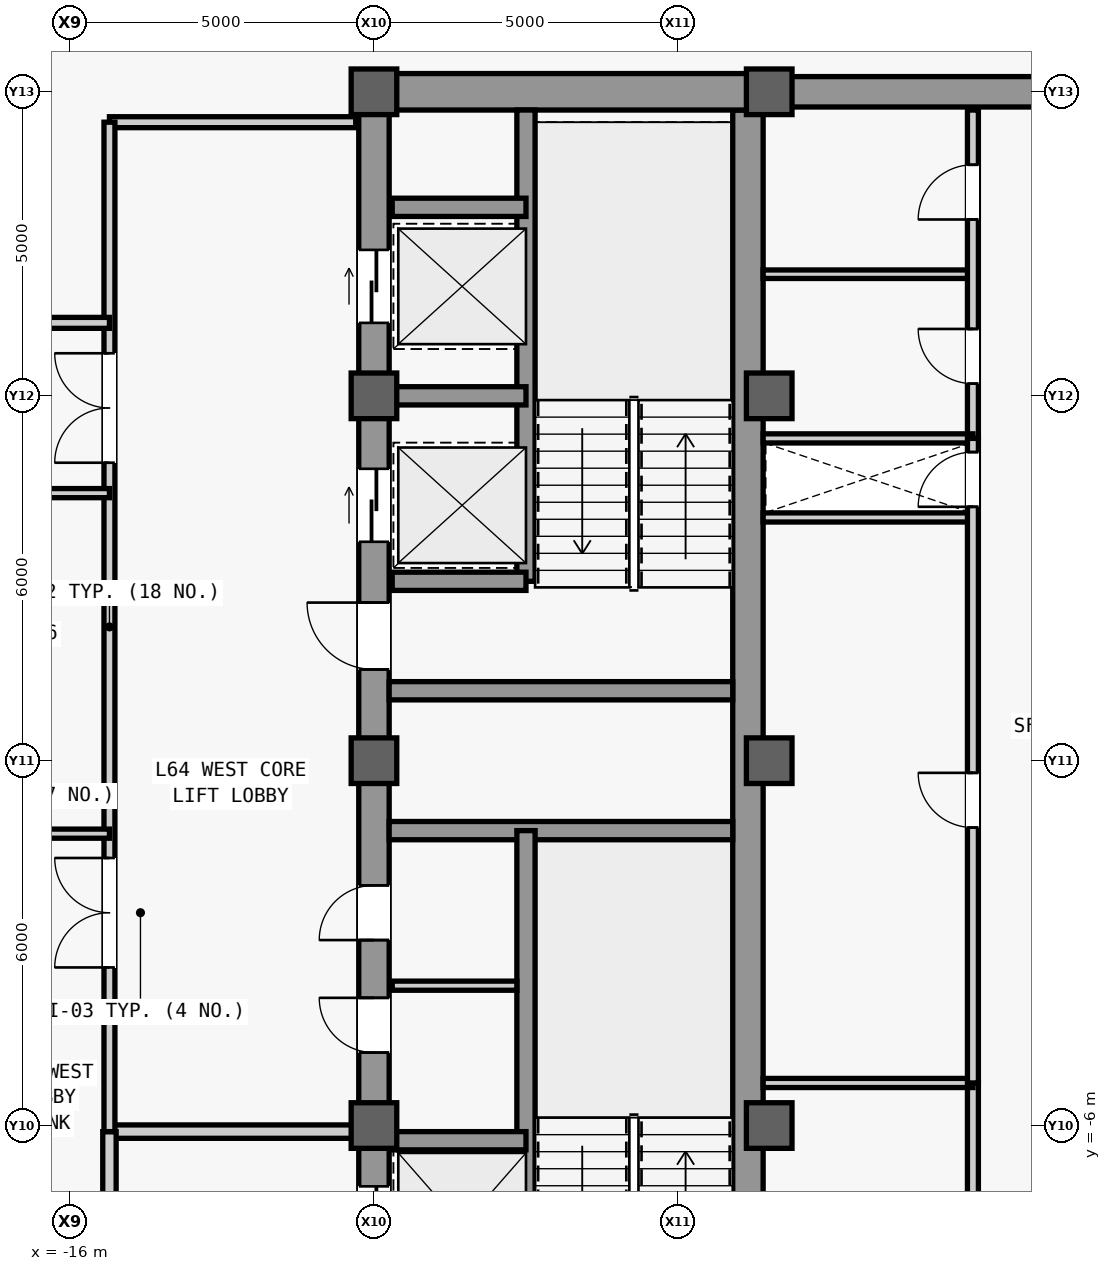
"""IFC4 building model, lengths in metres.
Left out: names, types, materials, properties, quantities, classifications, styles, units other than length and angle.
Written with IfcOpenShell. Run it as: python <this file> out.ifc"""

import sys

from ifc_helpers import new_model, si_unit, direction, frame, frame_2d, origin, origin_2d, place, context, subcontext, project, spatial, rectangle, extrude, source, transform, mapped, element, fill, save


model = new_model("IFC4")
c1 = context("Model", 3, precision=1e-05, world=origin(), true_north=direction((0.0, 1.0)))
c2 = subcontext(c1, "Body", "Model", "MODEL_VIEW")
j1 = project(units=[si_unit("LENGTHUNIT", "METRE"), si_unit("PLANEANGLEUNIT", "RADIAN")], contexts=[c1])
p1 = place(None, origin())
s1 = spatial("IfcSite", under=j1, at=p1, CompositionType="ELEMENT")
p2 = place(p1, origin())
s2 = spatial("IfcBuilding", under=s1, at=p2, CompositionType="ELEMENT")
p3 = place(p2, frame((0.0, 0.0, 273.5)))
s3 = spatial("IfcBuildingStorey", under=s2, at=p3, CompositionType="ELEMENT", Elevation=273.5)
m1 = source(origin(), c2, "Body", "SweptSolid", [
    extrude(rectangle(XDim=22.0, YDim=0.5, at=frame_2d((11.0, 0.0))), origin(), (0.0, 0.0, 1.0), 3.78),
])
p4 = place(p3, frame((-11.0, -11.0, 0.0), z_axis=(0.0, 0.0, 1.0), x_axis=(0.0, 1.0, 0.0)))
e1 = element("IfcWall", 1, at=p4, inside=s3, PredefinedType="SHEAR", context=c2, shape_type="MappedRepresentation", body=[
    mapped(m1, transform((0.0, 0.0, 0.0), scale=1.0)),
])
m2 = source(origin(), c2, "Body", "SweptSolid", [
    extrude(rectangle(XDim=1.1, YDim=2.2, at=frame_2d((0.55, 1.1))), frame((0.0, 0.26, 0.0), z_axis=(0.0, -1.0, 0.0), x_axis=(1.0, 0.0, 0.0)), (0.0, 0.0, 1.0), 0.52),
])
p5 = place(p4, frame((0.8, 0.0, 0.0)))
e2 = element("IfcOpeningElement", 2, at=p5, cuts=e1, PredefinedType="OPENING", context=c2, shape_type="MappedRepresentation", body=[
    mapped(m2, transform((0.0, 0.0, 0.0), scale=1.0)),
])
p6 = place(p4, frame((12.5, 0.0, 0.0)))
e3 = element("IfcOpeningElement", 3, at=p6, cuts=e1, PredefinedType="OPENING", context=c2, shape_type="MappedRepresentation", body=[
    mapped(m2, transform((0.0, 0.0, 0.0), scale=1.0)),
])
m3 = source(origin(), c2, "Body", "SweptSolid", [
    extrude(rectangle(XDim=0.9, YDim=2.15, at=frame_2d((0.45, 1.075))), frame((0.0, 0.26, 0.0), z_axis=(0.0, -1.0, 0.0), x_axis=(1.0, 0.0, 0.0)), (0.0, 0.0, 1.0), 0.52),
])
p7 = place(p4, frame((6.2, 0.0, 0.0)))
e4 = element("IfcOpeningElement", 4, at=p7, cuts=e1, PredefinedType="OPENING", context=c2, shape_type="MappedRepresentation", body=[
    mapped(m3, transform((0.0, 0.0, 0.0), scale=1.0)),
])
p8 = place(p4, frame((8.05, 0.0, 0.0)))
e5 = element("IfcOpeningElement", 5, at=p8, cuts=e1, PredefinedType="OPENING", context=c2, shape_type="MappedRepresentation", body=[
    mapped(m3, transform((0.0, 0.0, 0.0), scale=1.0)),
])
m4 = source(origin(), c2, "Body", "SweptSolid", [
    extrude(rectangle(XDim=1.2, YDim=2.3, at=frame_2d((0.6, 1.15))), frame((0.0, 0.26, 0.0), z_axis=(0.0, -1.0, 0.0), x_axis=(1.0, 0.0, 0.0)), (0.0, 0.0, 1.0), 0.52),
])
p9 = place(p4, frame((14.6, 0.0, 0.0)))
e6 = element("IfcOpeningElement", 6, at=p9, cuts=e1, PredefinedType="OPENING", context=c2, shape_type="MappedRepresentation", body=[
    mapped(m4, transform((0.0, 0.0, 0.0), scale=1.0)),
])
p10 = place(p4, frame((18.2, 0.0, 0.0)))
e7 = element("IfcOpeningElement", 7, at=p10, cuts=e1, PredefinedType="OPENING", context=c2, shape_type="MappedRepresentation", body=[
    mapped(m4, transform((0.0, 0.0, 0.0), scale=1.0)),
])
m5 = source(origin(), c2, "Body", "SweptSolid", [
    extrude(rectangle(XDim=1.3, YDim=2.3, at=frame_2d((0.65, 1.15))), frame((0.0, 0.26, 0.0), z_axis=(0.0, -1.0, 0.0), x_axis=(1.0, 0.0, 0.0)), (0.0, 0.0, 1.0), 0.52),
])
p11 = place(p4, frame((2.7, 0.0, 0.0)))
e8 = element("IfcOpeningElement", 8, at=p11, cuts=e1, PredefinedType="OPENING", context=c2, shape_type="MappedRepresentation", body=[
    mapped(m5, transform((0.0, 0.0, 0.0), scale=1.0)),
])
m6 = source(origin(), c2, "Body", "SweptSolid", [
    extrude(rectangle(XDim=21.4, YDim=0.5, at=frame_2d((10.7, 0.0))), origin(), (0.0, 0.0, 1.0), 3.78),
])
p12 = place(p3, frame((-4.85, -10.7, 0.0), z_axis=(0.0, 0.0, 1.0), x_axis=(0.0, 1.0, 0.0)))
e9 = element("IfcWall", 9, at=p12, inside=s3, PredefinedType="SHEAR", context=c2, shape_type="MappedRepresentation", body=[
    mapped(m6, transform((0.0, 0.0, 0.0), scale=1.0)),
])
m7 = source(origin(), c2, "Body", "SweptSolid", [
    extrude(rectangle(XDim=5.9, YDim=0.6, at=frame_2d((2.95, 0.0))), origin(), (0.0, 0.0, 1.0), 3.78),
])
p13 = place(p3, frame((-10.75, 11.0, 0.0), z_axis=(0.0, 0.0, 1.0), x_axis=(1.0, 0.0, 0.0)))
e10 = element("IfcWall", 10, at=p13, inside=s3, PredefinedType="SHEAR", context=c2, shape_type="MappedRepresentation", body=[
    mapped(m7, transform((0.0, 0.0, 0.0), scale=1.0)),
])
m8 = source(origin(), c2, "Body", "SweptSolid", [
    extrude(rectangle(XDim=5.65, YDim=0.3, at=frame_2d((2.825, 0.0))), origin(), (0.0, 0.0, 1.0), 3.78),
])
for number, where, z_axis, x_axis in (
    (11, (-10.75, -1.15, 0.0), (0.0, 0.0, 1.0), (1.0, 0.0, 0.0)),
    (12, (-10.75, 1.15, 0.0), (0.0, 0.0, 1.0), (1.0, 0.0, 0.0)),
):
    element("IfcWall", number, at=place(p3, frame(where, z_axis=z_axis, x_axis=x_axis)), inside=s3, PredefinedType="SHEAR", context=c2, shape_type="MappedRepresentation", body=[
        mapped(m8, transform((0.0, 0.0, 0.0), scale=1.0)),
    ])
m9 = source(origin(), c2, "Body", "SweptSolid", [
    extrude(rectangle(XDim=9.2, YDim=0.5, at=frame_2d((4.6, 0.0))), origin(), (0.0, 0.0, 1.0), 3.78),
])
p14 = place(p3, frame((-4.6, 11.0, 0.0), z_axis=(0.0, 0.0, 1.0), x_axis=(1.0, 0.0, 0.0)))
e13 = element("IfcWall", 13, at=p14, inside=s3, PredefinedType="SHEAR", context=c2, shape_type="MappedRepresentation", body=[
    mapped(m9, transform((0.0, 0.0, 0.0), scale=1.0)),
])
m10 = source(origin(), c2, "Body", "SweptSolid", [
    extrude(rectangle(XDim=0.75, YDim=0.75, at=origin_2d()), origin(), (0.0, 0.0, 1.0), 4.0),
])
for number, where, z_axis, x_axis in (
    (14, (-11.0, -6.0, 0.0), (0.0, 0.0, 1.0), (1.0, 0.0, 0.0)),
    (15, (-11.0, 0.0, 0.0), (0.0, 0.0, 1.0), (1.0, 0.0, 0.0)),
    (16, (-11.0, 6.0, 0.0), (0.0, 0.0, 1.0), (1.0, 0.0, 0.0)),
    (17, (-11.0, 11.0, 0.0), (0.0, 0.0, 1.0), (1.0, 0.0, 0.0)),
    (18, (-4.5, -6.0, 0.0), (0.0, 0.0, 1.0), (1.0, 0.0, 0.0)),
    (19, (-4.5, 0.0, 0.0), (0.0, 0.0, 1.0), (1.0, 0.0, 0.0)),
    (20, (-4.5, 6.0, 0.0), (0.0, 0.0, 1.0), (1.0, 0.0, 0.0)),
    (21, (-4.5, 11.0, 0.0), (0.0, 0.0, 1.0), (1.0, 0.0, 0.0)),
):
    element("IfcColumn", number, at=place(p3, frame(where, z_axis=z_axis, x_axis=x_axis)), inside=s3, PredefinedType="COLUMN", context=c2, shape_type="MappedRepresentation", body=[
        mapped(m10, transform((0.0, 0.0, 0.0), scale=1.0)),
    ])
m11 = source(origin(), c2, "Body", "SweptSolid", [
    extrude(rectangle(XDim=7.8, YDim=0.3, at=frame_2d((3.9, 0.0))), origin(), (0.0, 0.0, 1.0), 3.78),
])
p15 = place(p3, frame((-8.5, -8.95, 0.0), z_axis=(0.0, 0.0, 1.0), x_axis=(0.0, 1.0, 0.0)))
e22 = element("IfcWall", 22, at=p15, inside=s3, PredefinedType="SHEAR", context=c2, shape_type="MappedRepresentation", body=[
    mapped(m11, transform((0.0, 0.0, 0.0), scale=1.0)),
])
m12 = source(origin(), c2, "Body", "SweptSolid", [
    extrude(rectangle(XDim=2.2, YDim=0.3, at=frame_2d((1.1, 0.0))), origin(), (0.0, 0.0, 1.0), 3.78),
])
p16 = place(p3, frame((-10.7, -6.25, 0.0), z_axis=(0.0, 0.0, 1.0), x_axis=(1.0, 0.0, 0.0)))
e23 = element("IfcWall", 23, at=p16, inside=s3, PredefinedType="SHEAR", context=c2, shape_type="MappedRepresentation", body=[
    mapped(m12, transform((0.0, 0.0, 0.0), scale=1.0)),
])
m13 = source(origin(), c2, "Body", "SweptSolid", [
    extrude(rectangle(XDim=7.75, YDim=0.3, at=frame_2d((3.875, 0.0))), origin(), (0.0, 0.0, 1.0), 3.78),
])
p17 = place(p3, frame((-8.5, 2.95, 0.0), z_axis=(0.0, 0.0, 1.0), x_axis=(0.0, 1.0, 0.0)))
e24 = element("IfcWall", 24, at=p17, inside=s3, PredefinedType="SHEAR", context=c2, shape_type="MappedRepresentation", body=[
    mapped(m13, transform((0.0, 0.0, 0.0), scale=1.0)),
])
for number, where, z_axis, x_axis in (
    (25, (-10.7, 2.95, 0.0), (0.0, 0.0, 1.0), (1.0, 0.0, 0.0)),
    (26, (-10.7, 6.0, 0.0), (0.0, 0.0, 1.0), (1.0, 0.0, 0.0)),
    (27, (-10.7, 9.1, 0.0), (0.0, 0.0, 1.0), (1.0, 0.0, 0.0)),
):
    element("IfcWall", number, at=place(p3, frame(where, z_axis=z_axis, x_axis=x_axis)), inside=s3, PredefinedType="SHEAR", context=c2, shape_type="MappedRepresentation", body=[
        mapped(m12, transform((0.0, 0.0, 0.0), scale=1.0)),
    ])
m14 = source(origin(), c2, "Body", "SweptSolid", [
    extrude(rectangle(XDim=2.05, YDim=0.15, at=frame_2d((1.025, 0.0))), origin(), (0.0, 0.0, 1.0), 3.78),
])
p18 = place(p3, frame((-10.7, -3.7, 0.0), z_axis=(0.0, 0.0, 1.0), x_axis=(1.0, 0.0, 0.0)))
e28 = element("IfcWall", 28, at=p18, inside=s3, PredefinedType="PARTITIONING", context=c2, shape_type="MappedRepresentation", body=[
    mapped(m14, transform((0.0, 0.0, 0.0), scale=1.0)),
])
m15 = source(origin(), c2, "Body", "SweptSolid", [
    extrude(rectangle(XDim=4.05, YDim=0.22, at=frame_2d((2.025, 0.0))), origin(), (0.0, 0.0, 1.0), 3.085),
])
p19 = place(p3, frame((-15.35, -6.1, 0.0), z_axis=(0.0, 0.0, 1.0), x_axis=(1.0, 0.0, 0.0)))
e29 = element("IfcWall", 29, at=p19, inside=s3, PredefinedType="PARTITIONING", context=c2, shape_type="MappedRepresentation", body=[
    mapped(m15, transform((0.0, 0.0, 0.0), scale=1.0)),
])
m16 = source(origin(), c2, "Body", "SweptSolid", [
    extrude(rectangle(XDim=4.4, YDim=0.22, at=frame_2d((2.2, 0.0))), origin(), (0.0, 0.0, 1.0), 3.78),
])
p20 = place(p3, frame((-15.35, -10.5, 0.0), z_axis=(0.0, 0.0, 1.0), x_axis=(0.0, 1.0, 0.0)))
e30 = element("IfcWall", 30, at=p20, inside=s3, PredefinedType="PARTITIONING", context=c2, shape_type="MappedRepresentation", body=[
    mapped(m16, transform((0.0, 0.0, 0.0), scale=1.0)),
])
m17 = source(origin(), c2, "Body", "SweptSolid", [
    extrude(rectangle(XDim=1.2, YDim=2.2, at=frame_2d((0.6, 1.1))), frame((0.0, 0.12, 0.0), z_axis=(0.0, -1.0, 0.0), x_axis=(1.0, 0.0, 0.0)), (0.0, 0.0, 1.0), 0.24),
])
p21 = place(p20, frame((1.6, 0.0, 0.0)))
e31 = element("IfcOpeningElement", 31, at=p21, cuts=e30, PredefinedType="OPENING", context=c2, shape_type="MappedRepresentation", body=[
    mapped(m17, transform((0.0, 0.0, 0.0), scale=1.0)),
])
m18 = source(origin(), c2, "Body", "SweptSolid", [
    extrude(rectangle(XDim=4.05, YDim=0.18, at=frame_2d((2.025, 0.0))), origin(), (0.0, 0.0, 1.0), 3.78),
])
p22 = place(p3, frame((-15.35, 10.5, 0.0), z_axis=(0.0, 0.0, 1.0), x_axis=(1.0, 0.0, 0.0)))
e32 = element("IfcWall", 32, at=p22, inside=s3, PredefinedType="PARTITIONING", context=c2, shape_type="MappedRepresentation", body=[
    mapped(m18, transform((0.0, 0.0, 0.0), scale=1.0)),
])
m19 = source(origin(), c2, "Body", "SweptSolid", [
    extrude(rectangle(XDim=16.6, YDim=0.18, at=frame_2d((8.3, 0.0))), origin(), (0.0, 0.0, 1.0), 3.78),
])
p23 = place(p3, frame((-15.35, -6.1, 0.0), z_axis=(0.0, 0.0, 1.0), x_axis=(0.0, 1.0, 0.0)))
e33 = element("IfcWall", 33, at=p23, inside=s3, PredefinedType="PARTITIONING", context=c2, shape_type="MappedRepresentation", body=[
    mapped(m19, transform((0.0, 0.0, 0.0), scale=1.0)),
])
m20 = source(origin(), c2, "Body", "SweptSolid", [
    extrude(rectangle(XDim=1.8, YDim=2.25, at=frame_2d((0.9, 1.125))), frame((0.0, 0.1, 0.0), z_axis=(0.0, -1.0, 0.0), x_axis=(1.0, 0.0, 0.0)), (0.0, 0.0, 1.0), 0.2),
])
p24 = place(p23, frame((2.7, 0.0, 0.0)))
e34 = element("IfcOpeningElement", 34, at=p24, cuts=e33, PredefinedType="OPENING", context=c2, shape_type="MappedRepresentation", body=[
    mapped(m20, transform((0.0, 0.0, 0.0), scale=1.0)),
])
p25 = place(p23, frame((11.0, 0.0, 0.0)))
e35 = element("IfcOpeningElement", 35, at=p25, cuts=e33, PredefinedType="OPENING", context=c2, shape_type="MappedRepresentation", body=[
    mapped(m20, transform((0.0, 0.0, 0.0), scale=1.0)),
])
m21 = source(origin(), c2, "Body", "SweptSolid", [
    extrude(rectangle(XDim=3.45, YDim=0.15, at=frame_2d((1.725, 0.0))), origin(), (0.0, 0.0, 1.0), 3.78),
])
p26 = place(p3, frame((-4.6, 4.0, 0.0), z_axis=(0.0, 0.0, 1.0), x_axis=(1.0, 0.0, 0.0)))
e36 = element("IfcWall", 36, at=p26, inside=s3, PredefinedType="PARTITIONING", context=c2, shape_type="MappedRepresentation", body=[
    mapped(m21, transform((0.0, 0.0, 0.0), scale=1.0)),
])
m22 = source(origin(), c2, "Body", "SweptSolid", [
    extrude(rectangle(XDim=5.4, YDim=0.18, at=frame_2d((2.7, 0.0))), origin(), (0.0, 0.0, 1.0), 3.78),
])
p27 = place(p3, frame((-1.15, -10.7, 0.0), z_axis=(0.0, 0.0, 1.0), x_axis=(0.0, 1.0, 0.0)))
e37 = element("IfcWall", 37, at=p27, inside=s3, PredefinedType="PARTITIONING", context=c2, shape_type="MappedRepresentation", body=[
    mapped(m22, transform((0.0, 0.0, 0.0), scale=1.0)),
])
m23 = source(origin(), c2, "Body", "SweptSolid", [
    extrude(rectangle(XDim=0.9, YDim=2.15, at=frame_2d((0.45, 1.075))), frame((0.0, 0.1, 0.0), z_axis=(0.0, -1.0, 0.0), x_axis=(1.0, 0.0, 0.0)), (0.0, 0.0, 1.0), 0.2),
])
p28 = place(p27, frame((2.25, 0.0, 0.0)))
e38 = element("IfcOpeningElement", 38, at=p28, cuts=e37, PredefinedType="OPENING", context=c2, shape_type="MappedRepresentation", body=[
    mapped(m23, transform((0.0, 0.0, 0.0), scale=1.0)),
])
p29 = place(p3, frame((-4.6, -5.3, 0.0), z_axis=(0.0, 0.0, 1.0), x_axis=(1.0, 0.0, 0.0)))
e39 = element("IfcWall", 39, at=p29, inside=s3, PredefinedType="PARTITIONING", context=c2, shape_type="MappedRepresentation", body=[
    mapped(m21, transform((0.0, 0.0, 0.0), scale=1.0)),
])
m24 = source(origin(), c2, "Body", "SweptSolid", [
    extrude(rectangle(XDim=3.45, YDim=0.14, at=frame_2d((1.725, 0.0))), origin(), (0.0, 0.0, 1.0), 3.78),
])
p30 = place(p3, frame((-4.6, 8.0, 0.0), z_axis=(0.0, 0.0, 1.0), x_axis=(1.0, 0.0, 0.0)))
e40 = element("IfcWall", 40, at=p30, inside=s3, PredefinedType="PARTITIONING", context=c2, shape_type="MappedRepresentation", body=[
    mapped(m24, transform((0.0, 0.0, 0.0), scale=1.0)),
])
p31 = place(p3, frame((-1.15, 5.3, 0.0), z_axis=(0.0, 0.0, 1.0), x_axis=(0.0, 1.0, 0.0)))
e41 = element("IfcWall", 41, at=p31, inside=s3, PredefinedType="PARTITIONING", context=c2, shape_type="MappedRepresentation", body=[
    mapped(m22, transform((0.0, 0.0, 0.0), scale=1.0)),
])
p32 = place(p31, frame((0.9, 0.0, 0.0)))
e42 = element("IfcOpeningElement", 42, at=p32, cuts=e41, PredefinedType="OPENING", context=c2, shape_type="MappedRepresentation", body=[
    mapped(m23, transform((0.0, 0.0, 0.0), scale=1.0)),
])
p33 = place(p31, frame((3.6, 0.0, 0.0)))
e43 = element("IfcOpeningElement", 43, at=p33, cuts=e41, PredefinedType="OPENING", context=c2, shape_type="MappedRepresentation", body=[
    mapped(m23, transform((0.0, 0.0, 0.0), scale=1.0)),
])
p34 = place(p3, frame((-4.6, 5.3, 0.0), z_axis=(0.0, 0.0, 1.0), x_axis=(1.0, 0.0, 0.0)))
e44 = element("IfcWall", 44, at=p34, inside=s3, PredefinedType="PARTITIONING", context=c2, shape_type="MappedRepresentation", body=[
    mapped(m21, transform((0.0, 0.0, 0.0), scale=1.0)),
])
m25 = source(origin(), c2, "Body", "SweptSolid", [
    extrude(rectangle(XDim=10.6, YDim=0.18, at=frame_2d((5.3, 0.0))), origin(), (0.0, 0.0, 1.0), 3.78),
])
p35 = place(p3, frame((-1.15, -5.3, 0.0), z_axis=(0.0, 0.0, 1.0), x_axis=(0.0, 1.0, 0.0)))
e45 = element("IfcWall", 45, at=p35, inside=s3, PredefinedType="PARTITIONING", context=c2, shape_type="MappedRepresentation", body=[
    mapped(m25, transform((0.0, 0.0, 0.0), scale=1.0)),
])
p36 = place(p35, frame((4.2, 0.0, 0.0)))
e46 = element("IfcOpeningElement", 46, at=p36, cuts=e45, PredefinedType="OPENING", context=c2, shape_type="MappedRepresentation", body=[
    mapped(m23, transform((0.0, 0.0, 0.0), scale=1.0)),
])
p37 = place(p35, frame((9.475, 0.0, 0.0)))
e47 = element("IfcOpeningElement", 47, at=p37, cuts=e45, PredefinedType="OPENING", context=c2, shape_type="MappedRepresentation", body=[
    mapped(m23, transform((0.0, 0.0, 0.0), scale=1.0)),
])
m26 = source(origin(), c2, "Body", "SweptSolid", [
    extrude(rectangle(XDim=2.05, YDim=0.15, at=frame_2d((1.025, 0.0))), origin(), (0.0, 0.0, 1.0), 3.78),
])
for number, where, z_axis, x_axis in (
    (48, (-17.4, -1.2, 0.0), (0.0, 0.0, 1.0), (1.0, 0.0, 0.0)),
    (49, (-17.4, 4.4, 0.0), (0.0, 0.0, 1.0), (1.0, 0.0, 0.0)),
):
    element("IfcWall", number, at=place(p3, frame(where, z_axis=z_axis, x_axis=x_axis)), inside=s3, PredefinedType="PARTITIONING", context=c2, shape_type="MappedRepresentation", body=[
        mapped(m26, transform((0.0, 0.0, 0.0), scale=1.0)),
    ])
m27 = source(origin(), c2, "Body", "SweptSolid", [
    extrude(rectangle(XDim=2.05, YDim=0.18, at=frame_2d((1.025, 0.0))), origin(), (0.0, 0.0, 1.0), 3.78),
])
p38 = place(p3, frame((-17.4, 7.2, 0.0), z_axis=(0.0, 0.0, 1.0), x_axis=(1.0, 0.0, 0.0)))
e50 = element("IfcWall", 50, at=p38, inside=s3, PredefinedType="PARTITIONING", context=c2, shape_type="MappedRepresentation", body=[
    mapped(m27, transform((0.0, 0.0, 0.0), scale=1.0)),
])
m28 = source(origin(), c2, "Body", "SweptSolid", [
    extrude(rectangle(XDim=1.1, YDim=2.2, at=frame_2d((0.55, 1.1))), frame((0.0, 0.025, 0.0), z_axis=(0.0, -1.0, 0.0), x_axis=(1.0, 0.0, 0.0)), (0.0, 0.0, 1.0), 0.05),
])
p39 = place(p6, origin())
e51 = element("IfcDoor", 51, at=p39, inside=s3, OperationType="SINGLE_SWING_RIGHT", PredefinedType="DOOR", context=c2, shape_type="MappedRepresentation", body=[
    mapped(m28, transform((0.0, 0.0, 0.0), scale=1.0)),
])
fill(e3, e51)
m29 = source(origin(), c2, "Body", "SweptSolid", [
    extrude(rectangle(XDim=0.9, YDim=2.15, at=frame_2d((0.45, 1.075))), frame((0.0, 0.025, 0.0), z_axis=(0.0, -1.0, 0.0), x_axis=(1.0, 0.0, 0.0)), (0.0, 0.0, 1.0), 0.05),
])
p40 = place(p7, origin())
e52 = element("IfcDoor", 52, at=p40, inside=s3, OperationType="SINGLE_SWING_RIGHT", PredefinedType="DOOR", context=c2, shape_type="MappedRepresentation", body=[
    mapped(m29, transform((0.0, 0.0, 0.0), scale=1.0)),
])
fill(e4, e52)
p41 = place(p8, origin())
e53 = element("IfcDoor", 53, at=p41, inside=s3, OperationType="SINGLE_SWING_LEFT", PredefinedType="DOOR", context=c2, shape_type="MappedRepresentation", body=[
    mapped(m29, transform((0.0, 0.0, 0.0), scale=1.0)),
])
fill(e5, e53)
m30 = source(origin(), c2, "Body", "SweptSolid", [
    extrude(rectangle(XDim=1.8, YDim=2.25, at=frame_2d((0.9, 1.125))), frame((0.0, 0.025, 0.0), z_axis=(0.0, -1.0, 0.0), x_axis=(1.0, 0.0, 0.0)), (0.0, 0.0, 1.0), 0.05),
])
p42 = place(p24, origin())
e54 = element("IfcDoor", 54, at=p42, inside=s3, OperationType="SINGLE_SWING_LEFT", PredefinedType="DOOR", context=c2, shape_type="MappedRepresentation", body=[
    mapped(m30, transform((0.0, 0.0, 0.0), scale=1.0)),
])
fill(e34, e54)
p43 = place(p25, origin())
e55 = element("IfcDoor", 55, at=p43, inside=s3, OperationType="SINGLE_SWING_RIGHT", PredefinedType="DOOR", context=c2, shape_type="MappedRepresentation", body=[
    mapped(m30, transform((0.0, 0.0, 0.0), scale=1.0)),
])
fill(e35, e55)
p44 = place(p32, origin())
e56 = element("IfcDoor", 56, at=p44, inside=s3, OperationType="SINGLE_SWING_RIGHT", PredefinedType="DOOR", context=c2, shape_type="MappedRepresentation", body=[
    mapped(m29, transform((0.0, 0.0, 0.0), scale=1.0)),
])
fill(e42, e56)
p45 = place(p33, origin())
e57 = element("IfcDoor", 57, at=p45, inside=s3, OperationType="SINGLE_SWING_LEFT", PredefinedType="DOOR", context=c2, shape_type="MappedRepresentation", body=[
    mapped(m29, transform((0.0, 0.0, 0.0), scale=1.0)),
])
fill(e43, e57)
p46 = place(p36, origin())
e58 = element("IfcDoor", 58, at=p46, inside=s3, OperationType="SINGLE_SWING_RIGHT", PredefinedType="DOOR", context=c2, shape_type="MappedRepresentation", body=[
    mapped(m29, transform((0.0, 0.0, 0.0), scale=1.0)),
])
fill(e46, e58)
p47 = place(p37, origin())
e59 = element("IfcDoor", 59, at=p47, inside=s3, OperationType="SINGLE_SWING_LEFT", PredefinedType="DOOR", context=c2, shape_type="MappedRepresentation", body=[
    mapped(m29, transform((0.0, 0.0, 0.0), scale=1.0)),
])
fill(e47, e59)
m31 = source(origin(), c2, "Body", "SweptSolid", [
    extrude(rectangle(XDim=1.2, YDim=2.3, at=frame_2d((0.6, 1.15))), frame((0.0, 0.025, 0.0), z_axis=(0.0, -1.0, 0.0), x_axis=(1.0, 0.0, 0.0)), (0.0, 0.0, 1.0), 0.05),
])
p48 = place(p9, origin())
e60 = element("IfcDoor", 60, at=p48, inside=s3, OperationType="SLIDING_TO_LEFT", PredefinedType="DOOR", context=c2, shape_type="MappedRepresentation", body=[
    mapped(m31, transform((0.0, 0.0, 0.0), scale=1.0)),
])
fill(e6, e60)
p49 = place(p10, origin())
e61 = element("IfcDoor", 61, at=p49, inside=s3, OperationType="SLIDING_TO_LEFT", PredefinedType="DOOR", context=c2, shape_type="MappedRepresentation", body=[
    mapped(m31, transform((0.0, 0.0, 0.0), scale=1.0)),
])
fill(e7, e61)
m32 = source(origin(), c2, "Body", "SweptSolid", [
    extrude(rectangle(XDim=1.3, YDim=2.3, at=frame_2d((0.65, 1.15))), frame((0.0, 0.025, 0.0), z_axis=(0.0, -1.0, 0.0), x_axis=(1.0, 0.0, 0.0)), (0.0, 0.0, 1.0), 0.05),
])
p50 = place(p11, origin())
e62 = element("IfcDoor", 62, at=p50, inside=s3, OperationType="SLIDING_TO_LEFT", PredefinedType="DOOR", context=c2, shape_type="MappedRepresentation", body=[
    mapped(m32, transform((0.0, 0.0, 0.0), scale=1.0)),
])
fill(e8, e62)
save(model, sys.argv[1])
